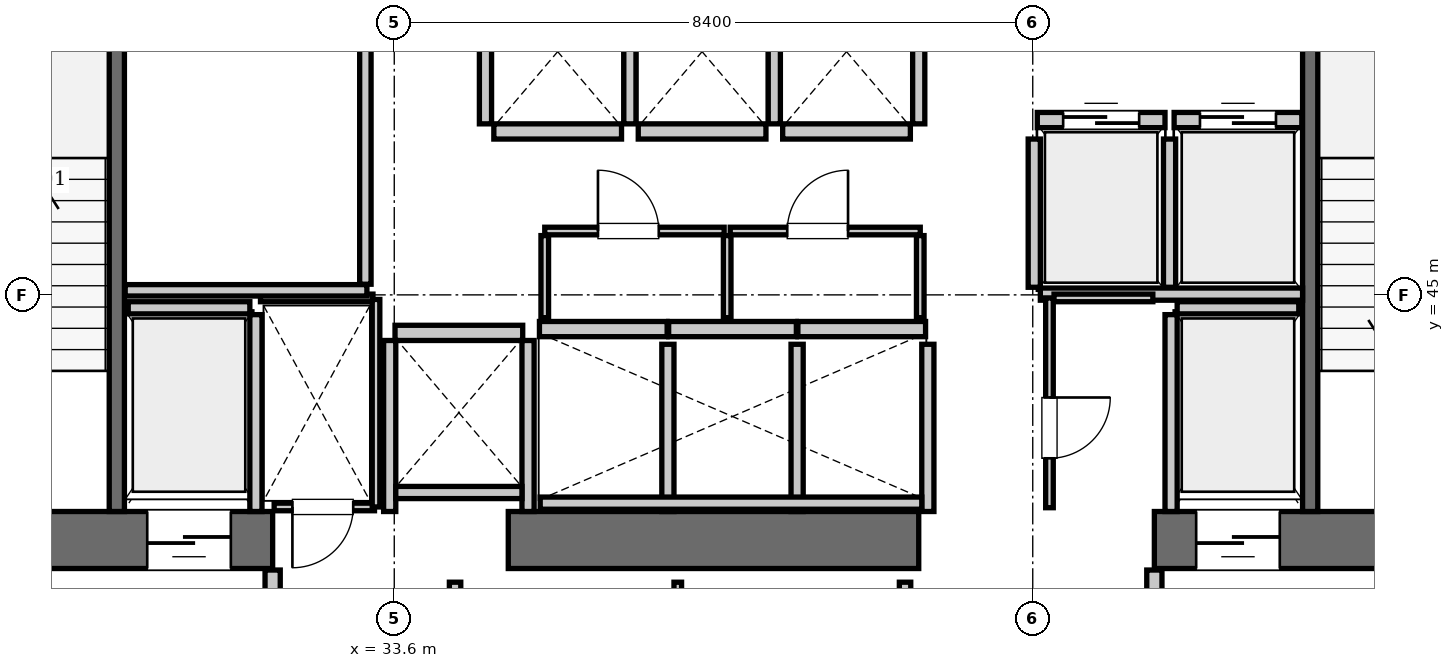
"""IFC4 building model, lengths in metres.
Left out: names, types, materials, properties, quantities, classifications, styles, units other than length and angle.
Written with IfcOpenShell. Run it as: python <this file> out.ifc"""

import sys

from ifc_helpers import new_model, si_unit, direction, frame, frame_2d, origin, place, context, subcontext, project, spatial, rectangle, extrude, element, fill, save


model = new_model("IFC4")
c1 = context("Model", 3, precision=1e-05, world=origin(), true_north=direction((0.0, 1.0)))
c2 = subcontext(c1, "Body", "Model", "MODEL_VIEW")
j1 = project(units=[si_unit("LENGTHUNIT", "METRE"), si_unit("PLANEANGLEUNIT", "RADIAN")], contexts=[c1])
p1 = place(None, origin())
s1 = spatial("IfcSite", under=j1, at=p1, CompositionType="ELEMENT")
p2 = place(p1, origin())
s2 = spatial("IfcBuilding", under=s1, at=p2, CompositionType="ELEMENT")
p3 = place(p2, frame((0.0, 0.0, 146.65)))
s3 = spatial("IfcBuildingStorey", under=s2, at=p3, CompositionType="ELEMENT", Elevation=146.65)
p4 = place(p3, frame((25.2, 41.775, 0.0), z_axis=(0.0, 0.0, 1.0), x_axis=(1.0, 0.0, 0.0)))
e1 = element("IfcWall", 1, at=p4, inside=s3, PredefinedType="SHEAR", context=c2, shape_type="SweptSolid", body=[
    extrude(rectangle(XDim=6.8, YDim=0.75, at=frame_2d((3.4, 0.0))), origin(), (0.0, 0.0, 1.0), 3.85),
])
p5 = place(p4, frame((1.65, 0.0, 0.0)))
e2 = element("IfcOpeningElement", 2, at=p5, cuts=e1, PredefinedType="OPENING", context=c2, shape_type="SweptSolid", body=[
    extrude(rectangle(XDim=1.15, YDim=2.15, at=frame_2d((0.575, 1.075))), frame((0.0, 0.385, 0.0), z_axis=(0.0, -1.0, 0.0), x_axis=(1.0, 0.0, 0.0)), (0.0, 0.0, 1.0), 0.77),
])
p6 = place(p4, frame((5.15, 0.0, 0.0)))
e3 = element("IfcOpeningElement", 3, at=p6, cuts=e1, PredefinedType="OPENING", context=c2, shape_type="SweptSolid", body=[
    extrude(rectangle(XDim=1.1, YDim=2.2, at=frame_2d((0.55, 1.1))), frame((0.0, 0.385, 0.0), z_axis=(0.0, -1.0, 0.0), x_axis=(1.0, 0.0, 0.0)), (0.0, 0.0, 1.0), 0.77),
])
p7 = place(p3, frame((35.1, 41.775, 0.0), z_axis=(0.0, 0.0, 1.0), x_axis=(1.0, 0.0, 0.0)))
e4 = element("IfcWall", 4, at=p7, inside=s3, PredefinedType="SHEAR", context=c2, shape_type="SweptSolid", body=[
    extrude(rectangle(XDim=5.4, YDim=0.75, at=frame_2d((2.7, 0.0))), origin(), (0.0, 0.0, 1.0), 3.85),
])
p8 = place(p3, frame((43.6, 41.775, 0.0), z_axis=(0.0, 0.0, 1.0), x_axis=(1.0, 0.0, 0.0)))
e5 = element("IfcWall", 5, at=p8, inside=s3, PredefinedType="SHEAR", context=c2, shape_type="SweptSolid", body=[
    extrude(rectangle(XDim=6.8, YDim=0.75, at=frame_2d((3.4, 0.0))), origin(), (0.0, 0.0, 1.0), 3.85),
])
p9 = place(p8, frame((3.9, 0.0, 0.0)))
e6 = element("IfcOpeningElement", 6, at=p9, cuts=e5, PredefinedType="OPENING", context=c2, shape_type="SweptSolid", body=[
    extrude(rectangle(XDim=1.15, YDim=2.15, at=frame_2d((0.575, 1.075))), frame((0.0, 0.385, 0.0), z_axis=(0.0, -1.0, 0.0), x_axis=(1.0, 0.0, 0.0)), (0.0, 0.0, 1.0), 0.77),
])
p10 = place(p8, frame((0.55, 0.0, 0.0)))
e7 = element("IfcOpeningElement", 7, at=p10, cuts=e5, PredefinedType="OPENING", context=c2, shape_type="SweptSolid", body=[
    extrude(rectangle(XDim=1.1, YDim=2.2, at=frame_2d((0.55, 1.1))), frame((0.0, 0.385, 0.0), z_axis=(0.0, -1.0, 0.0), x_axis=(1.0, 0.0, 0.0)), (0.0, 0.0, 1.0), 0.77),
])
for number, where, z_axis, x_axis in (
    (8, (29.95, 42.15, 0.0), (0.0, 0.0, 1.0), (0.0, 1.0, 0.0)),
    (9, (45.65, 42.15, 0.0), (0.0, 0.0, 1.0), (0.0, 1.0, 0.0)),
):
    element("IfcWall", number, at=place(p3, frame(where, z_axis=z_axis, x_axis=x_axis)), inside=s3, PredefinedType="SOLIDWALL", context=c2, shape_type="SweptSolid", body=[
        extrude(rectangle(XDim=9.0, YDim=0.2, at=frame_2d((4.5, 0.0))), origin(), (0.0, 0.0, 1.0), 3.61),
    ])
p11 = place(p3, frame((42.06, 47.3, 0.0), z_axis=(0.0, 0.0, 1.0), x_axis=(1.0, 0.0, 0.0)))
e10 = element("IfcWall", 10, at=p11, inside=s3, PredefinedType="SOLIDWALL", context=c2, shape_type="SweptSolid", body=[
    extrude(rectangle(XDim=1.68, YDim=0.2, at=frame_2d((0.84, 0.0))), origin(), (0.0, 0.0, 1.0), 3.61),
])
p12 = place(p11, frame((0.34, 0.0, 0.0)))
e11 = element("IfcOpeningElement", 11, at=p12, cuts=e10, PredefinedType="OPENING", context=c2, shape_type="SweptSolid", body=[
    extrude(rectangle(XDim=1.0, YDim=2.15, at=frame_2d((0.5, 1.075))), frame((0.0, 0.11, 0.0), z_axis=(0.0, -1.0, 0.0), x_axis=(1.0, 0.0, 0.0)), (0.0, 0.0, 1.0), 0.22),
])
p13 = place(p3, frame((43.86, 47.3, 0.0), z_axis=(0.0, 0.0, 1.0), x_axis=(1.0, 0.0, 0.0)))
e12 = element("IfcWall", 12, at=p13, inside=s3, PredefinedType="SOLIDWALL", context=c2, shape_type="SweptSolid", body=[
    extrude(rectangle(XDim=1.68, YDim=0.2, at=frame_2d((0.84, 0.0))), origin(), (0.0, 0.0, 1.0), 3.61),
])
p14 = place(p13, frame((0.34, 0.0, 0.0)))
e13 = element("IfcOpeningElement", 13, at=p14, cuts=e12, PredefinedType="OPENING", context=c2, shape_type="SweptSolid", body=[
    extrude(rectangle(XDim=1.0, YDim=2.15, at=frame_2d((0.5, 1.075))), frame((0.0, 0.11, 0.0), z_axis=(0.0, -1.0, 0.0), x_axis=(1.0, 0.0, 0.0)), (0.0, 0.0, 1.0), 0.22),
])
for number, where, z_axis, x_axis in (
    (14, (35.51, 44.55, 0.0), (0.0, 0.0, 1.0), (1.0, 0.0, 0.0)),
    (15, (37.21, 44.55, 0.0), (0.0, 0.0, 1.0), (1.0, 0.0, 0.0)),
):
    element("IfcWall", number, at=place(p3, frame(where, z_axis=z_axis, x_axis=x_axis)), inside=s3, PredefinedType="SOLIDWALL", context=c2, shape_type="SweptSolid", body=[
        extrude(rectangle(XDim=1.68, YDim=0.2, at=frame_2d((0.84, 0.0))), origin(), (0.0, 0.0, 1.0), 3.61),
    ])
for number, where, z_axis, x_axis in (
    (16, (38.91, 44.55, 0.0), (0.0, 0.0, 1.0), (1.0, 0.0, 0.0)),
    (17, (34.91, 47.15, 0.0), (0.0, 0.0, 1.0), (1.0, 0.0, 0.0)),
):
    element("IfcWall", number, at=place(p3, frame(where, z_axis=z_axis, x_axis=x_axis)), inside=s3, PredefinedType="SOLIDWALL", context=c2, shape_type="SweptSolid", body=[
        extrude(rectangle(XDim=1.68, YDim=0.2, at=frame_2d((0.84, 0.0))), origin(), (0.0, 0.0, 1.0), 3.61),
    ])
for number, where, z_axis, x_axis in (
    (18, (36.81, 47.15, 0.0), (0.0, 0.0, 1.0), (1.0, 0.0, 0.0)),
    (19, (38.71, 47.15, 0.0), (0.0, 0.0, 1.0), (1.0, 0.0, 0.0)),
    (20, (33.61, 44.5, 0.0), (0.0, 0.0, 1.0), (1.0, 0.0, 0.0)),
):
    element("IfcWall", number, at=place(p3, frame(where, z_axis=z_axis, x_axis=x_axis)), inside=s3, PredefinedType="SOLIDWALL", context=c2, shape_type="SweptSolid", body=[
        extrude(rectangle(XDim=1.68, YDim=0.2, at=frame_2d((0.84, 0.0))), origin(), (0.0, 0.0, 1.0), 3.61),
    ])
p15 = place(p3, frame((30.1, 44.83, 0.0), z_axis=(0.0, 0.0, 1.0), x_axis=(1.0, 0.0, 0.0)))
e21 = element("IfcWall", 21, at=p15, inside=s3, PredefinedType="SOLIDWALL", context=c2, shape_type="SweptSolid", body=[
    extrude(rectangle(XDim=1.6, YDim=0.16, at=frame_2d((0.8, 0.0))), origin(), (0.0, 0.0, 1.0), 3.61),
])
p16 = place(p3, frame((31.78, 42.15, 0.0), z_axis=(0.0, 0.0, 1.0), x_axis=(0.0, 1.0, 0.0)))
e22 = element("IfcWall", 22, at=p16, inside=s3, PredefinedType="SOLIDWALL", context=c2, shape_type="SweptSolid", body=[
    extrude(rectangle(XDim=2.59, YDim=0.16, at=frame_2d((1.295, 0.0))), origin(), (0.0, 0.0, 1.0), 3.61),
])
p17 = place(p3, frame((43.9, 44.83, 0.0), z_axis=(0.0, 0.0, 1.0), x_axis=(1.0, 0.0, 0.0)))
e23 = element("IfcWall", 23, at=p17, inside=s3, PredefinedType="SOLIDWALL", context=c2, shape_type="SweptSolid", body=[
    extrude(rectangle(XDim=1.6, YDim=0.16, at=frame_2d((0.8, 0.0))), origin(), (0.0, 0.0, 1.0), 3.61),
])
p18 = place(p3, frame((43.82, 42.15, 0.0), z_axis=(0.0, 0.0, 1.0), x_axis=(0.0, 1.0, 0.0)))
e24 = element("IfcWall", 24, at=p18, inside=s3, PredefinedType="SOLIDWALL", context=c2, shape_type="SweptSolid", body=[
    extrude(rectangle(XDim=2.59, YDim=0.16, at=frame_2d((1.295, 0.0))), origin(), (0.0, 0.0, 1.0), 3.61),
])
for number, where, z_axis, x_axis in (
    (25, (42.02, 45.1, 0.0), (0.0, 0.0, 1.0), (0.0, 1.0, 0.0)),
    (26, (43.8, 45.1, 0.0), (0.0, 0.0, 1.0), (0.0, 1.0, 0.0)),
):
    element("IfcWall", number, at=place(p3, frame(where, z_axis=z_axis, x_axis=x_axis)), inside=s3, PredefinedType="SOLIDWALL", context=c2, shape_type="SweptSolid", body=[
        extrude(rectangle(XDim=1.95, YDim=0.16, at=frame_2d((0.975, 0.0))), origin(), (0.0, 0.0, 1.0), 3.61),
    ])
p19 = place(p3, frame((42.1, 45.01, 0.0), z_axis=(0.0, 0.0, 1.0), x_axis=(1.0, 0.0, 0.0)))
e27 = element("IfcWall", 27, at=p19, inside=s3, PredefinedType="SOLIDWALL", context=c2, shape_type="SweptSolid", body=[
    extrude(rectangle(XDim=3.45, YDim=0.16, at=frame_2d((1.725, 0.0))), origin(), (0.0, 0.0, 1.0), 3.61),
])
for number, where, z_axis, x_axis in (
    (28, (37.2, 42.15, 0.0), (0.0, 0.0, 1.0), (0.0, 1.0, 0.0)),
    (29, (38.9, 42.15, 0.0), (0.0, 0.0, 1.0), (0.0, 1.0, 0.0)),
    (30, (40.62, 42.15, 0.0), (0.0, 0.0, 1.0), (0.0, 1.0, 0.0)),
):
    element("IfcWall", number, at=place(p3, frame(where, z_axis=z_axis, x_axis=x_axis)), inside=s3, PredefinedType="SOLIDWALL", context=c2, shape_type="SweptSolid", body=[
        extrude(rectangle(XDim=2.2, YDim=0.16, at=frame_2d((1.1, 0.0))), origin(), (0.0, 0.0, 1.0), 3.61),
    ])
p20 = place(p3, frame((35.52, 42.26, 0.0), z_axis=(0.0, 0.0, 1.0), x_axis=(1.0, 0.0, 0.0)))
e31 = element("IfcWall", 31, at=p20, inside=s3, PredefinedType="SOLIDWALL", context=c2, shape_type="SweptSolid", body=[
    extrude(rectangle(XDim=5.02, YDim=0.16, at=frame_2d((2.51, 0.0))), origin(), (0.0, 0.0, 1.0), 3.61),
])
for number, where, z_axis, x_axis in (
    (32, (34.8, 47.25, 0.0), (0.0, 0.0, 1.0), (0.0, 1.0, 0.0)),
    (33, (36.7, 47.25, 0.0), (0.0, 0.0, 1.0), (0.0, 1.0, 0.0)),
    (34, (38.6, 47.25, 0.0), (0.0, 0.0, 1.0), (0.0, 1.0, 0.0)),
    (35, (40.5, 47.25, 0.0), (0.0, 0.0, 1.0), (0.0, 1.0, 0.0)),
):
    element("IfcWall", number, at=place(p3, frame(where, z_axis=z_axis, x_axis=x_axis)), inside=s3, PredefinedType="SOLIDWALL", context=c2, shape_type="SweptSolid", body=[
        extrude(rectangle(XDim=2.19, YDim=0.16, at=frame_2d((1.095, 0.0))), origin(), (0.0, 0.0, 1.0), 3.61),
    ])
for number, where, z_axis, x_axis in (
    (36, (33.54, 42.15, 0.0), (0.0, 0.0, 1.0), (0.0, 1.0, 0.0)),
    (37, (35.36, 42.15, 0.0), (0.0, 0.0, 1.0), (0.0, 1.0, 0.0)),
):
    element("IfcWall", number, at=place(p3, frame(where, z_axis=z_axis, x_axis=x_axis)), inside=s3, PredefinedType="SOLIDWALL", context=c2, shape_type="SweptSolid", body=[
        extrude(rectangle(XDim=2.25, YDim=0.16, at=frame_2d((1.125, 0.0))), origin(), (0.0, 0.0, 1.0), 3.61),
    ])
p21 = place(p3, frame((33.62, 42.4, 0.0), z_axis=(0.0, 0.0, 1.0), x_axis=(1.0, 0.0, 0.0)))
e38 = element("IfcWall", 38, at=p21, inside=s3, PredefinedType="SOLIDWALL", context=c2, shape_type="SweptSolid", body=[
    extrude(rectangle(XDim=1.66, YDim=0.16, at=frame_2d((0.83, 0.0))), origin(), (0.0, 0.0, 1.0), 3.61),
])
for number, where, z_axis, x_axis in (
    (39, (32.0, 38.31, 0.0), (0.0, 0.0, 1.0), (0.0, 1.0, 0.0)),
    (40, (43.6, 38.31, 0.0), (0.0, 0.0, 1.0), (0.0, 1.0, 0.0)),
):
    element("IfcWall", number, at=place(p3, frame(where, z_axis=z_axis, x_axis=x_axis)), inside=s3, PredefinedType="PARTITIONING", context=c2, shape_type="SweptSolid", body=[
        extrude(rectangle(XDim=3.07, YDim=0.2, at=frame_2d((1.535, 0.0))), origin(), (0.0, 0.0, 1.0), 3.61),
    ])
p22 = place(p3, frame((32.02, 42.21, 0.0), z_axis=(0.0, 0.0, 1.0), x_axis=(1.0, 0.0, 0.0)))
e41 = element("IfcWall", 41, at=p22, inside=s3, PredefinedType="PARTITIONING", context=c2, shape_type="SweptSolid", body=[
    extrude(rectangle(XDim=1.32, YDim=0.1, at=frame_2d((0.66, 0.0))), origin(), (0.0, 0.0, 1.0), 3.61),
])
p23 = place(p22, frame((0.24, 0.0, 0.0)))
e42 = element("IfcOpeningElement", 42, at=p23, cuts=e41, PredefinedType="OPENING", context=c2, shape_type="SweptSolid", body=[
    extrude(rectangle(XDim=0.8, YDim=2.05, at=frame_2d((0.4, 1.025))), frame((0.0, 0.06, 0.0), z_axis=(0.0, -1.0, 0.0), x_axis=(1.0, 0.0, 0.0)), (0.0, 0.0, 1.0), 0.12),
])
p24 = place(p3, frame((31.84, 44.96, 0.0), z_axis=(0.0, 0.0, 1.0), x_axis=(1.0, 0.0, 0.0)))
e43 = element("IfcWall", 43, at=p24, inside=s3, PredefinedType="PARTITIONING", context=c2, shape_type="SweptSolid", body=[
    extrude(rectangle(XDim=1.48, YDim=0.1, at=frame_2d((0.74, 0.0))), origin(), (0.0, 0.0, 1.0), 3.61),
])
p25 = place(p3, frame((33.36, 42.21, 0.0), z_axis=(0.0, 0.0, 1.0), x_axis=(0.0, 1.0, 0.0)))
e44 = element("IfcWall", 44, at=p25, inside=s3, PredefinedType="PARTITIONING", context=c2, shape_type="SweptSolid", body=[
    extrude(rectangle(XDim=2.73, YDim=0.1, at=frame_2d((1.365, 0.0))), origin(), (0.0, 0.0, 1.0), 3.61),
])
p26 = place(p3, frame((35.58, 45.84, 0.0), z_axis=(0.0, 0.0, 1.0), x_axis=(1.0, 0.0, 0.0)))
e45 = element("IfcWall", 45, at=p26, inside=s3, PredefinedType="PARTITIONING", context=c2, shape_type="SweptSolid", body=[
    extrude(rectangle(XDim=2.36, YDim=0.1, at=frame_2d((1.18, 0.0))), origin(), (0.0, 0.0, 1.0), 3.61),
])
p27 = place(p26, frame((0.7, 0.0, 0.0)))
e46 = element("IfcOpeningElement", 46, at=p27, cuts=e45, PredefinedType="OPENING", context=c2, shape_type="SweptSolid", body=[
    extrude(rectangle(XDim=0.8, YDim=2.05, at=frame_2d((0.4, 1.025))), frame((0.0, 0.06, 0.0), z_axis=(0.0, -1.0, 0.0), x_axis=(1.0, 0.0, 0.0)), (0.0, 0.0, 1.0), 0.12),
])
p28 = place(p3, frame((38.02, 45.84, 0.0), z_axis=(0.0, 0.0, 1.0), x_axis=(1.0, 0.0, 0.0)))
e47 = element("IfcWall", 47, at=p28, inside=s3, PredefinedType="PARTITIONING", context=c2, shape_type="SweptSolid", body=[
    extrude(rectangle(XDim=2.5, YDim=0.1, at=frame_2d((1.25, 0.0))), origin(), (0.0, 0.0, 1.0), 3.61),
])
p29 = place(p28, frame((0.75, 0.0, 0.0)))
e48 = element("IfcOpeningElement", 48, at=p29, cuts=e47, PredefinedType="OPENING", context=c2, shape_type="SweptSolid", body=[
    extrude(rectangle(XDim=0.8, YDim=2.05, at=frame_2d((0.4, 1.025))), frame((0.0, 0.06, 0.0), z_axis=(0.0, -1.0, 0.0), x_axis=(1.0, 0.0, 0.0)), (0.0, 0.0, 1.0), 0.12),
])
for number, where, z_axis, x_axis in (
    (49, (35.58, 44.7, 0.0), (0.0, 0.0, 1.0), (0.0, 1.0, 0.0)),
    (50, (37.98, 44.7, 0.0), (0.0, 0.0, 1.0), (0.0, 1.0, 0.0)),
    (51, (40.52, 44.7, 0.0), (0.0, 0.0, 1.0), (0.0, 1.0, 0.0)),
):
    element("IfcWall", number, at=place(p3, frame(where, z_axis=z_axis, x_axis=x_axis)), inside=s3, PredefinedType="PARTITIONING", context=c2, shape_type="SweptSolid", body=[
        extrude(rectangle(XDim=1.08, YDim=0.1, at=frame_2d((0.54, 0.0))), origin(), (0.0, 0.0, 1.0), 3.61),
    ])
p30 = place(p3, frame((42.22, 42.2, 0.0), z_axis=(0.0, 0.0, 1.0), x_axis=(0.0, 1.0, 0.0)))
e52 = element("IfcWall", 52, at=p30, inside=s3, PredefinedType="PARTITIONING", context=c2, shape_type="SweptSolid", body=[
    extrude(rectangle(XDim=2.76, YDim=0.1, at=frame_2d((1.38, 0.0))), origin(), (0.0, 0.0, 1.0), 3.61),
])
p31 = place(p30, frame((0.65, 0.0, 0.0)))
e53 = element("IfcOpeningElement", 53, at=p31, cuts=e52, PredefinedType="OPENING", context=c2, shape_type="SweptSolid", body=[
    extrude(rectangle(XDim=0.8, YDim=2.05, at=frame_2d((0.4, 1.025))), frame((0.0, 0.06, 0.0), z_axis=(0.0, -1.0, 0.0), x_axis=(1.0, 0.0, 0.0)), (0.0, 0.0, 1.0), 0.12),
])
p32 = place(p3, frame((42.28, 44.96, 0.0), z_axis=(0.0, 0.0, 1.0), x_axis=(1.0, 0.0, 0.0)))
e54 = element("IfcWall", 54, at=p32, inside=s3, PredefinedType="PARTITIONING", context=c2, shape_type="SweptSolid", body=[
    extrude(rectangle(XDim=1.3, YDim=0.1, at=frame_2d((0.65, 0.0))), origin(), (0.0, 0.0, 1.0), 3.61),
])
p33 = place(p3, frame((30.06, 45.06, 0.0), z_axis=(0.0, 0.0, 1.0), x_axis=(1.0, 0.0, 0.0)))
e55 = element("IfcWall", 55, at=p33, inside=s3, PredefinedType="PARTITIONING", context=c2, shape_type="SweptSolid", body=[
    extrude(rectangle(XDim=3.18, YDim=0.15, at=frame_2d((1.59, 0.0))), origin(), (0.0, 0.0, 1.0), 3.61),
])
p34 = place(p3, frame((33.22, 45.14, 0.0), z_axis=(0.0, 0.0, 1.0), x_axis=(0.0, 1.0, 0.0)))
e56 = element("IfcWall", 56, at=p34, inside=s3, PredefinedType="PARTITIONING", context=c2, shape_type="SweptSolid", body=[
    extrude(rectangle(XDim=4.16, YDim=0.15, at=frame_2d((2.08, 0.0))), origin(), (0.0, 0.0, 1.0), 3.61),
])
p35 = place(p3, frame((34.4, 38.38, 0.0), z_axis=(0.0, 0.0, 1.0), x_axis=(0.0, 1.0, 0.0)))
e57 = element("IfcWall", 57, at=p35, inside=s3, PredefinedType="PARTITIONING", context=c2, shape_type="SweptSolid", body=[
    extrude(rectangle(XDim=2.84, YDim=0.15, at=frame_2d((1.42, 0.0))), origin(), (0.0, 0.0, 1.0), 3.61),
])
p36 = place(p3, frame((37.33, 38.38, 0.0), z_axis=(0.0, 0.0, 1.0), x_axis=(0.0, 1.0, 0.0)))
e58 = element("IfcWall", 58, at=p36, inside=s3, PredefinedType="PARTITIONING", context=c2, shape_type="SweptSolid", body=[
    extrude(rectangle(XDim=2.84, YDim=0.1, at=frame_2d((1.42, 0.0))), origin(), (0.0, 0.0, 1.0), 3.61),
])
p37 = place(p3, frame((40.32, 38.38, 0.0), z_axis=(0.0, 0.0, 1.0), x_axis=(0.0, 1.0, 0.0)))
e59 = element("IfcWall", 59, at=p37, inside=s3, PredefinedType="PARTITIONING", context=c2, shape_type="SweptSolid", body=[
    extrude(rectangle(XDim=2.84, YDim=0.15, at=frame_2d((1.42, 0.0))), origin(), (0.0, 0.0, 1.0), 3.61),
])
p38 = place(p12, origin())
e60 = element("IfcDoor", 60, at=p38, inside=s3, OperationType="SLIDING_TO_LEFT", PredefinedType="DOOR", context=c2, shape_type="SweptSolid", body=[
    extrude(rectangle(XDim=1.0, YDim=2.15, at=frame_2d((0.5, 1.075))), frame((0.0, 0.025, 0.0), z_axis=(0.0, -1.0, 0.0), x_axis=(1.0, 0.0, 0.0)), (0.0, 0.0, 1.0), 0.05),
])
fill(e11, e60)
p39 = place(p14, origin())
e61 = element("IfcDoor", 61, at=p39, inside=s3, OperationType="SLIDING_TO_LEFT", PredefinedType="DOOR", context=c2, shape_type="SweptSolid", body=[
    extrude(rectangle(XDim=1.0, YDim=2.15, at=frame_2d((0.5, 1.075))), frame((0.0, 0.025, 0.0), z_axis=(0.0, -1.0, 0.0), x_axis=(1.0, 0.0, 0.0)), (0.0, 0.0, 1.0), 0.05),
])
fill(e13, e61)
p40 = place(p6, frame((1.1, 0.0, 0.0), z_axis=(0.0, 0.0, 1.0), x_axis=(-1.0, 0.0, 0.0)))
e62 = element("IfcDoor", 62, at=p40, inside=s3, OperationType="SLIDING_TO_LEFT", PredefinedType="DOOR", context=c2, shape_type="SweptSolid", body=[
    extrude(rectangle(XDim=1.1, YDim=2.2, at=frame_2d((0.55, 1.1))), frame((0.0, 0.025, 0.0), z_axis=(0.0, -1.0, 0.0), x_axis=(1.0, 0.0, 0.0)), (0.0, 0.0, 1.0), 0.05),
])
fill(e3, e62)
p41 = place(p10, frame((1.1, 0.0, 0.0), z_axis=(0.0, 0.0, 1.0), x_axis=(-1.0, 0.0, 0.0)))
e63 = element("IfcDoor", 63, at=p41, inside=s3, OperationType="SLIDING_TO_LEFT", PredefinedType="DOOR", context=c2, shape_type="SweptSolid", body=[
    extrude(rectangle(XDim=1.1, YDim=2.2, at=frame_2d((0.55, 1.1))), frame((0.0, 0.025, 0.0), z_axis=(0.0, -1.0, 0.0), x_axis=(1.0, 0.0, 0.0)), (0.0, 0.0, 1.0), 0.05),
])
fill(e7, e63)
p42 = place(p23, frame((0.8, 0.0, 0.0), z_axis=(0.0, 0.0, 1.0), x_axis=(-1.0, 0.0, 0.0)))
e64 = element("IfcDoor", 64, at=p42, inside=s3, OperationType="SINGLE_SWING_RIGHT", PredefinedType="DOOR", context=c2, shape_type="SweptSolid", body=[
    extrude(rectangle(XDim=0.8, YDim=2.05, at=frame_2d((0.4, 1.025))), frame((0.0, 0.025, 0.0), z_axis=(0.0, -1.0, 0.0), x_axis=(1.0, 0.0, 0.0)), (0.0, 0.0, 1.0), 0.05),
])
fill(e42, e64)
p43 = place(p27, origin())
e65 = element("IfcDoor", 65, at=p43, inside=s3, OperationType="SINGLE_SWING_LEFT", PredefinedType="DOOR", context=c2, shape_type="SweptSolid", body=[
    extrude(rectangle(XDim=0.8, YDim=2.05, at=frame_2d((0.4, 1.025))), frame((0.0, 0.025, 0.0), z_axis=(0.0, -1.0, 0.0), x_axis=(1.0, 0.0, 0.0)), (0.0, 0.0, 1.0), 0.05),
])
fill(e46, e65)
p44 = place(p29, origin())
e66 = element("IfcDoor", 66, at=p44, inside=s3, OperationType="SINGLE_SWING_RIGHT", PredefinedType="DOOR", context=c2, shape_type="SweptSolid", body=[
    extrude(rectangle(XDim=0.8, YDim=2.05, at=frame_2d((0.4, 1.025))), frame((0.0, 0.025, 0.0), z_axis=(0.0, -1.0, 0.0), x_axis=(1.0, 0.0, 0.0)), (0.0, 0.0, 1.0), 0.05),
])
fill(e48, e66)
p45 = place(p31, frame((0.8, 0.0, 0.0), z_axis=(0.0, 0.0, 1.0), x_axis=(-1.0, 0.0, 0.0)))
e67 = element("IfcDoor", 67, at=p45, inside=s3, OperationType="SINGLE_SWING_LEFT", PredefinedType="DOOR", context=c2, shape_type="SweptSolid", body=[
    extrude(rectangle(XDim=0.8, YDim=2.05, at=frame_2d((0.4, 1.025))), frame((0.0, 0.025, 0.0), z_axis=(0.0, -1.0, 0.0), x_axis=(1.0, 0.0, 0.0)), (0.0, 0.0, 1.0), 0.05),
])
fill(e53, e67)
save(model, sys.argv[1])
